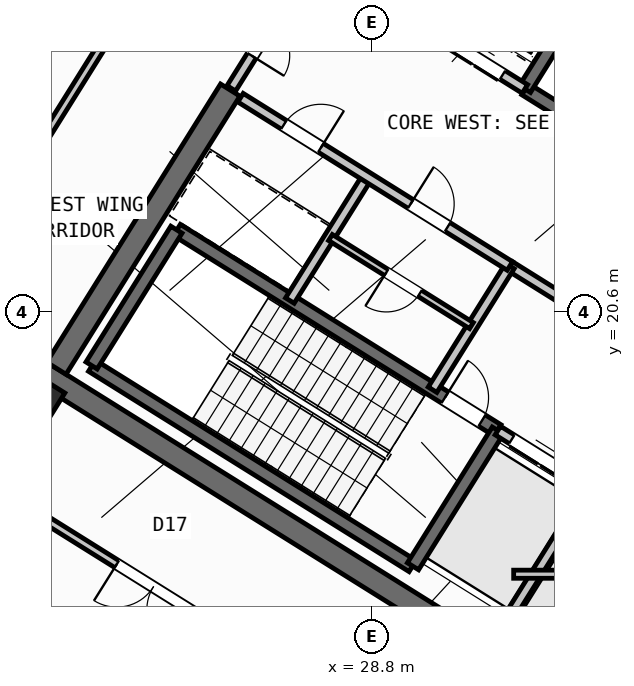
"""IFC4 building model, lengths in metres.
Left out: names, types, materials, properties, quantities, classifications, styles, units other than length and angle.
Written with IfcOpenShell. Run it as: python <this file> out.ifc"""

import sys

from ifc_helpers import new_model, si_unit, direction, frame, frame_2d, origin, origin_2d, place, context, subcontext, project, spatial, rectangle, hollow_rectangle, extrude, source, transform, mapped, element, fill, save


model = new_model("IFC4")
c1 = context("Model", 3, precision=1e-05, world=origin(), true_north=direction((0.0, 1.0)))
c2 = subcontext(c1, "Body", "Model", "MODEL_VIEW")
j1 = project(units=[si_unit("LENGTHUNIT", "METRE"), si_unit("PLANEANGLEUNIT", "RADIAN")], contexts=[c1])
p1 = place(None, origin())
s1 = spatial("IfcSite", under=j1, at=p1, CompositionType="ELEMENT")
p2 = place(p1, origin())
s2 = spatial("IfcBuilding", under=s1, at=p2, CompositionType="ELEMENT")
p3 = place(p2, frame((0.0, 0.0, 233.7)))
s3 = spatial("IfcBuildingStorey", under=s2, at=p3, CompositionType="ELEMENT", Elevation=233.7)
p4 = place(p3, frame((40.531, 24.036, 0.0), z_axis=(0.0, 0.0, 1.0), x_axis=(-0.848048787466, 0.529918157905, 0.0)))
e1 = element("IfcWall", 1, at=p4, inside=s3, PredefinedType="SHEAR", context=c2, shape_type="SweptSolid", body=[
    extrude(rectangle(XDim=13.04, YDim=0.45, at=frame_2d((6.52, 0.0))), origin(), (0.0, 0.0, 1.0), 4.55),
])
p5 = place(p3, frame((33.324, 12.503, 0.0), z_axis=(0.0, 0.0, 1.0), x_axis=(-0.848043529849, 0.529926571782, 0.0)))
e2 = element("IfcWall", 2, at=p5, inside=s3, PredefinedType="SHEAR", context=c2, shape_type="SweptSolid", body=[
    extrude(rectangle(XDim=13.04, YDim=0.45, at=frame_2d((6.52, 0.0))), origin(), (0.0, 0.0, 1.0), 4.55),
])
p6 = place(p3, frame((26.007, 24.976, 0.0), z_axis=(0.0, 0.0, 1.0), x_axis=(-0.529931155655, -0.848040665456, 0.0)))
e3 = element("IfcWall", 3, at=p6, inside=s3, PredefinedType="SHEAR", context=c2, shape_type="SweptSolid", body=[
    extrude(rectangle(XDim=6.475, YDim=0.45, at=frame_2d((3.238, 0.0))), origin(), (0.0, 0.0, 1.0), 4.55),
])
m1 = source(origin(), c2, "Body", "SweptSolid", [
    extrude(hollow_rectangle(XDim=0.8, YDim=0.8, WallThickness=0.032, at=origin_2d()), origin(), (0.0, 0.0, 1.0), 4.8),
])
p7 = place(p3, frame((22.191, 18.87, 0.0), z_axis=(0.0, 0.0, 1.0), x_axis=(-0.848048096156, 0.529919264233, 0.0)))
e4 = element("IfcColumn", 4, at=p7, inside=s3, PredefinedType="COLUMN", context=c2, shape_type="MappedRepresentation", body=[
    mapped(m1, transform((0.0, 0.0, 0.0), scale=1.0)),
])
p8 = place(p3, frame((29.268, 6.429, 0.0), z_axis=(0.0, 0.0, 1.0), x_axis=(-0.848049971435, 0.529916263149, 0.0)))
e5 = element("IfcWall", 5, at=p8, inside=s3, PredefinedType="STANDARD", context=c2, shape_type="SweptSolid", body=[
    extrude(rectangle(XDim=31.588, YDim=0.32, at=frame_2d((15.794, 0.0))), origin(), (0.0, 0.0, 1.0), 4.55),
])
p9 = place(p8, frame((15.901, 0.0, 0.0)))
e6 = element("IfcOpeningElement", 6, at=p9, cuts=e5, PredefinedType="OPENING", context=c2, shape_type="SweptSolid", body=[
    extrude(rectangle(XDim=1.2, YDim=2.15, at=frame_2d((0.6, 1.075))), frame((0.0, 0.17, 0.0), z_axis=(0.0, -1.0, 0.0), x_axis=(1.0, 0.0, 0.0)), (0.0, 0.0, 1.0), 0.34),
])
p10 = place(p8, frame((3.454, 0.0, 0.95)))
e7 = element("IfcOpeningElement", 7, at=p10, cuts=e5, PredefinedType="OPENING", context=c2, shape_type="SweptSolid", body=[
    extrude(rectangle(XDim=1.2, YDim=1.4, at=frame_2d((0.6, 0.7))), frame((0.0, 0.17, 0.0), z_axis=(0.0, -1.0, 0.0), x_axis=(1.0, 0.0, 0.0)), (0.0, 0.0, 1.0), 0.34),
])
p11 = place(p8, frame((7.561, 0.0, 0.85)))
e8 = element("IfcOpeningElement", 8, at=p11, cuts=e5, PredefinedType="OPENING", context=c2, shape_type="SweptSolid", body=[
    extrude(rectangle(XDim=1.8, YDim=1.5, at=frame_2d((0.9, 0.75))), frame((0.0, 0.17, 0.0), z_axis=(0.0, -1.0, 0.0), x_axis=(1.0, 0.0, 0.0)), (0.0, 0.0, 1.0), 0.34),
])
p12 = place(p8, frame((28.254, 0.0, 0.95)))
e9 = element("IfcOpeningElement", 9, at=p12, cuts=e5, PredefinedType="OPENING", context=c2, shape_type="SweptSolid", body=[
    extrude(rectangle(XDim=1.2, YDim=1.4, at=frame_2d((0.6, 0.7))), frame((0.0, 0.17, 0.0), z_axis=(0.0, -1.0, 0.0), x_axis=(1.0, 0.0, 0.0)), (0.0, 0.0, 1.0), 0.34),
])
p13 = place(p8, frame((19.234, 0.0, 1.0)))
e10 = element("IfcOpeningElement", 10, at=p13, cuts=e5, PredefinedType="OPENING", context=c2, shape_type="SweptSolid", body=[
    extrude(rectangle(XDim=0.9, YDim=1.25, at=frame_2d((0.45, 0.625))), frame((0.0, 0.17, 0.0), z_axis=(0.0, -1.0, 0.0), x_axis=(1.0, 0.0, 0.0)), (0.0, 0.0, 1.0), 0.34),
])
p14 = place(p8, frame((21.721, 0.0, 1.0)))
e11 = element("IfcOpeningElement", 11, at=p14, cuts=e5, PredefinedType="OPENING", context=c2, shape_type="SweptSolid", body=[
    extrude(rectangle(XDim=0.65, YDim=1.15, at=frame_2d((0.325, 0.575))), frame((0.0, 0.17, 0.0), z_axis=(0.0, -1.0, 0.0), x_axis=(1.0, 0.0, 0.0)), (0.0, 0.0, 1.0), 0.34),
])
p15 = place(p8, frame((23.631, 0.0, 1.0)))
e12 = element("IfcOpeningElement", 12, at=p15, cuts=e5, PredefinedType="OPENING", context=c2, shape_type="SweptSolid", body=[
    extrude(rectangle(XDim=0.9, YDim=1.25, at=frame_2d((0.45, 0.625))), frame((0.0, 0.17, 0.0), z_axis=(0.0, -1.0, 0.0), x_axis=(1.0, 0.0, 0.0)), (0.0, 0.0, 1.0), 0.34),
])
p16 = place(p8, frame((25.666, 0.0, 1.0)))
e13 = element("IfcOpeningElement", 13, at=p16, cuts=e5, PredefinedType="OPENING", context=c2, shape_type="SweptSolid", body=[
    extrude(rectangle(XDim=0.9, YDim=1.25, at=frame_2d((0.45, 0.625))), frame((0.0, 0.17, 0.0), z_axis=(0.0, -1.0, 0.0), x_axis=(1.0, 0.0, 0.0)), (0.0, 0.0, 1.0), 0.34),
])
p17 = place(p3, frame((14.138, 41.825, 0.0), z_axis=(0.0, 0.0, 1.0), x_axis=(0.848046498049, -0.529921821731, 0.0)))
e14 = element("IfcWall", 14, at=p17, inside=s3, PredefinedType="STANDARD", context=c2, shape_type="SweptSolid", body=[
    extrude(rectangle(XDim=31.588, YDim=0.32, at=frame_2d((15.794, 0.0))), origin(), (0.0, 0.0, 1.0), 4.55),
])
p18 = place(p17, frame((2.526, 0.0, 0.0)))
e15 = element("IfcOpeningElement", 15, at=p18, cuts=e14, PredefinedType="OPENING", context=c2, shape_type="SweptSolid", body=[
    extrude(rectangle(XDim=1.05, YDim=2.15, at=frame_2d((0.525, 1.075))), frame((0.0, 0.17, 0.0), z_axis=(0.0, -1.0, 0.0), x_axis=(1.0, 0.0, 0.0)), (0.0, 0.0, 1.0), 0.34),
])
p19 = place(p17, frame((14.274, 0.0, 0.0)))
e16 = element("IfcOpeningElement", 16, at=p19, cuts=e14, PredefinedType="OPENING", context=c2, shape_type="SweptSolid", body=[
    extrude(rectangle(XDim=1.5, YDim=2.25, at=frame_2d((0.75, 1.125))), frame((0.0, 0.17, 0.0), z_axis=(0.0, -1.0, 0.0), x_axis=(1.0, 0.0, 0.0)), (0.0, 0.0, 1.0), 0.34),
])
p20 = place(p17, frame((0.775, 0.0, 0.95)))
e17 = element("IfcOpeningElement", 17, at=p20, cuts=e14, PredefinedType="OPENING", context=c2, shape_type="SweptSolid", body=[
    extrude(rectangle(XDim=1.2, YDim=1.4, at=frame_2d((0.6, 0.7))), frame((0.0, 0.17, 0.0), z_axis=(0.0, -1.0, 0.0), x_axis=(1.0, 0.0, 0.0)), (0.0, 0.0, 1.0), 0.34),
])
p21 = place(p17, frame((9.552, 0.0, 0.85)))
e18 = element("IfcOpeningElement", 18, at=p21, cuts=e14, PredefinedType="OPENING", context=c2, shape_type="SweptSolid", body=[
    extrude(rectangle(XDim=1.8, YDim=1.5, at=frame_2d((0.9, 0.75))), frame((0.0, 0.17, 0.0), z_axis=(0.0, -1.0, 0.0), x_axis=(1.0, 0.0, 0.0)), (0.0, 0.0, 1.0), 0.34),
])
p22 = place(p17, frame((21.969, 0.0, 0.95)))
e19 = element("IfcOpeningElement", 19, at=p22, cuts=e14, PredefinedType="OPENING", context=c2, shape_type="SweptSolid", body=[
    extrude(rectangle(XDim=1.2, YDim=1.4, at=frame_2d((0.6, 0.7))), frame((0.0, 0.17, 0.0), z_axis=(0.0, -1.0, 0.0), x_axis=(1.0, 0.0, 0.0)), (0.0, 0.0, 1.0), 0.34),
])
p23 = place(p17, frame((27.619, 0.0, 0.95)))
e20 = element("IfcOpeningElement", 20, at=p23, cuts=e14, PredefinedType="OPENING", context=c2, shape_type="SweptSolid", body=[
    extrude(rectangle(XDim=1.2, YDim=1.4, at=frame_2d((0.6, 0.7))), frame((0.0, 0.17, 0.0), z_axis=(0.0, -1.0, 0.0), x_axis=(1.0, 0.0, 0.0)), (0.0, 0.0, 1.0), 0.34),
])
p24 = place(p3, frame((29.605, 15.581, 0.0), z_axis=(0.0, 0.0, 1.0), x_axis=(-0.848036911448, 0.529937163087, 0.0)))
e21 = element("IfcWall", 21, at=p24, inside=s3, PredefinedType="SHEAR", context=c2, shape_type="SweptSolid", body=[
    extrude(rectangle(XDim=7.46, YDim=0.26, at=frame_2d((3.73, 0.0))), origin(), (0.0, 0.0, 1.0), 4.55),
])
p25 = place(p3, frame((31.28, 18.261, 0.0), z_axis=(0.0, 0.0, 1.0), x_axis=(-0.848051618787, 0.529913626805, 0.0)))
e22 = element("IfcWall", 22, at=p25, inside=s3, PredefinedType="SHEAR", context=c2, shape_type="SweptSolid", body=[
    extrude(rectangle(XDim=7.46, YDim=0.26, at=frame_2d((3.73, 0.0))), origin(), (0.0, 0.0, 1.0), 4.55),
])
p26 = place(p25, frame((0.36, 0.0, 0.0)))
e23 = element("IfcOpeningElement", 23, at=p26, cuts=e22, PredefinedType="OPENING", context=c2, shape_type="SweptSolid", body=[
    extrude(rectangle(XDim=0.86, YDim=2.05, at=frame_2d((0.43, 1.025))), frame((0.0, 0.14, 0.0), z_axis=(0.0, -1.0, 0.0), x_axis=(1.0, 0.0, 0.0)), (0.0, 0.0, 1.0), 0.28),
])
p27 = place(p3, frame((31.288, 18.256, 0.0), z_axis=(0.0, 0.0, 1.0), x_axis=(-0.529943379326, -0.848033026897, 0.0)))
e24 = element("IfcWall", 24, at=p27, inside=s3, PredefinedType="SHEAR", context=c2, shape_type="SweptSolid", body=[
    extrude(rectangle(XDim=3.16, YDim=0.26, at=frame_2d((1.58, 0.0))), origin(), (0.0, 0.0, 1.0), 4.55),
])
p28 = place(p3, frame((24.945, 22.22, 0.0), z_axis=(0.0, 0.0, 1.0), x_axis=(-0.529908658664, -0.84805472316, 0.0)))
e25 = element("IfcWall", 25, at=p28, inside=s3, PredefinedType="SHEAR", context=c2, shape_type="SweptSolid", body=[
    extrude(rectangle(XDim=3.16, YDim=0.26, at=frame_2d((1.58, 0.0))), origin(), (0.0, 0.0, 1.0), 4.55),
])
p29 = place(p3, frame((38.046, 21.108, 0.0), z_axis=(0.0, 0.0, 1.0), x_axis=(-0.848054434086, 0.529909121291, 0.0)))
e26 = element("IfcWall", 26, at=p29, inside=s3, PredefinedType="SHEAR", context=c2, shape_type="SweptSolid", body=[
    extrude(rectangle(XDim=7.33, YDim=0.26, at=frame_2d((3.665, 0.0))), origin(), (0.0, 0.0, 1.0), 4.55),
])
p30 = place(p29, frame((0.22, 0.0, 0.0)))
e27 = element("IfcOpeningElement", 27, at=p30, cuts=e26, PredefinedType="OPENING", context=c2, shape_type="SweptSolid", body=[
    extrude(rectangle(XDim=1.1, YDim=2.1, at=frame_2d((0.55, 1.05))), frame((0.0, 0.14, 0.0), z_axis=(0.0, -1.0, 0.0), x_axis=(1.0, 0.0, 0.0)), (0.0, 0.0, 1.0), 0.28),
])
p31 = place(p3, frame((33.496, 27.677, 0.0), z_axis=(0.0, 0.0, 1.0), x_axis=(-0.529908658664, -0.84805472316, 0.0)))
e28 = element("IfcWall", 28, at=p31, inside=s3, PredefinedType="SHEAR", context=c2, shape_type="SweptSolid", body=[
    extrude(rectangle(XDim=3.16, YDim=0.26, at=frame_2d((1.58, 0.0))), origin(), (0.0, 0.0, 1.0), 4.55),
])
p32 = place(p3, frame((34.933, 15.978, 0.0), z_axis=(0.0, 0.0, 1.0), x_axis=(-0.848055739377, 0.529907032327, 0.0)))
e29 = element("IfcWall", 29, at=p32, inside=s3, PredefinedType="STANDARD", context=c2, shape_type="SweptSolid", body=[
    extrude(rectangle(XDim=4.298, YDim=0.2, at=frame_2d((2.149, 0.0))), origin(), (0.0, 0.0, 1.0), 4.54),
])
p33 = place(p32, frame((0.448, 0.0, 0.0)))
e30 = element("IfcOpeningElement", 30, at=p33, cuts=e29, PredefinedType="OPENING", context=c2, shape_type="SweptSolid", body=[
    extrude(rectangle(XDim=1.3, YDim=2.2, at=frame_2d((0.65, 1.1))), frame((0.0, 0.11, 0.0), z_axis=(0.0, -1.0, 0.0), x_axis=(1.0, 0.0, 0.0)), (0.0, 0.0, 1.0), 0.22),
])
p34 = place(p32, frame((2.523, 0.0, 0.0)))
e31 = element("IfcOpeningElement", 31, at=p34, cuts=e29, PredefinedType="OPENING", context=c2, shape_type="SweptSolid", body=[
    extrude(rectangle(XDim=1.45, YDim=2.25, at=frame_2d((0.725, 1.125))), frame((0.0, 0.11, 0.0), z_axis=(0.0, -1.0, 0.0), x_axis=(1.0, 0.0, 0.0)), (0.0, 0.0, 1.0), 0.22),
])
p35 = place(p3, frame((36.459, 18.421, 0.0), z_axis=(0.0, 0.0, 1.0), x_axis=(-0.848059591691, 0.529900867089, 0.0)))
e32 = element("IfcWall", 32, at=p35, inside=s3, PredefinedType="STANDARD", context=c2, shape_type="SweptSolid", body=[
    extrude(rectangle(XDim=5.818, YDim=0.2, at=frame_2d((2.909, 0.0))), origin(), (0.0, 0.0, 1.0), 4.54),
])
p36 = place(p35, frame((2.598, 0.0, 0.0)))
e33 = element("IfcOpeningElement", 33, at=p36, cuts=e32, PredefinedType="OPENING", context=c2, shape_type="SweptSolid", body=[
    extrude(rectangle(XDim=1.15, YDim=2.1, at=frame_2d((0.575, 1.05))), frame((0.0, 0.11, 0.0), z_axis=(0.0, -1.0, 0.0), x_axis=(1.0, 0.0, 0.0)), (0.0, 0.0, 1.0), 0.22),
])
p37 = place(p3, frame((31.822, 24.998, 0.0), z_axis=(0.0, 0.0, 1.0), x_axis=(-0.848054125777, 0.529909614701, 0.0)))
e34 = element("IfcWall", 34, at=p37, inside=s3, PredefinedType="STANDARD", context=c2, shape_type="SweptSolid", body=[
    extrude(rectangle(XDim=4.668, YDim=0.2, at=frame_2d((2.334, 0.0))), origin(), (0.0, 0.0, 1.0), 4.54),
])
p38 = place(p37, frame((0.52, 0.0, 0.0)))
e35 = element("IfcOpeningElement", 35, at=p38, cuts=e34, PredefinedType="OPENING", context=c2, shape_type="SweptSolid", body=[
    extrude(rectangle(XDim=1.2, YDim=2.15, at=frame_2d((0.6, 1.075))), frame((0.0, 0.11, 0.0), z_axis=(0.0, -1.0, 0.0), x_axis=(1.0, 0.0, 0.0)), (0.0, 0.0, 1.0), 0.22),
])
p39 = place(p37, frame((2.54, 0.0, 0.0)))
e36 = element("IfcOpeningElement", 36, at=p39, cuts=e34, PredefinedType="OPENING", context=c2, shape_type="SweptSolid", body=[
    extrude(rectangle(XDim=1.2, YDim=2.15, at=frame_2d((0.6, 1.075))), frame((0.0, 0.11, 0.0), z_axis=(0.0, -1.0, 0.0), x_axis=(1.0, 0.0, 0.0)), (0.0, 0.0, 1.0), 0.22),
])
p40 = place(p3, frame((33.029, 17.003, 0.0), z_axis=(0.0, 0.0, 1.0), x_axis=(-0.529916267533, -0.848049968695, 0.0)))
e37 = element("IfcWall", 37, at=p40, inside=s3, PredefinedType="STANDARD", context=c2, shape_type="SweptSolid", body=[
    extrude(rectangle(XDim=2.92, YDim=0.2, at=frame_2d((1.46, 0.0))), origin(), (0.0, 0.0, 1.0), 4.54),
])
for number, where, z_axis, x_axis in (
    (38, (31.525, 21.504, 0.0), (0.0, 0.0, 1.0), (-0.53, -0.848, 0.0)),
    (39, (28.71, 23.263, 0.0), (0.0, 0.0, 1.0), (-0.53, -0.848, 0.0)),
):
    element("IfcWall", number, at=place(p3, frame(where, z_axis=z_axis, x_axis=x_axis)), inside=s3, PredefinedType="STANDARD", context=c2, shape_type="SweptSolid", body=[
        extrude(rectangle(XDim=2.88, YDim=0.2, at=frame_2d((1.44, 0.0))), origin(), (0.0, 0.0, 1.0), 4.54),
    ])
p41 = place(p3, frame((31.525, 21.504, 0.0), z_axis=(0.0, 0.0, 1.0), x_axis=(-0.848042066329, 0.529928913853, 0.0)))
e40 = element("IfcWall", 40, at=p41, inside=s3, PredefinedType="STANDARD", context=c2, shape_type="SweptSolid", body=[
    extrude(rectangle(XDim=6.268, YDim=0.2, at=frame_2d((3.134, 0.0))), origin(), (0.0, 0.0, 1.0), 4.54),
])
p42 = place(p41, frame((4.4, 0.0, 0.0)))
e41 = element("IfcOpeningElement", 41, at=p42, cuts=e40, PredefinedType="OPENING", context=c2, shape_type="SweptSolid", body=[
    extrude(rectangle(XDim=0.86, YDim=2.05, at=frame_2d((0.43, 1.025))), frame((0.0, 0.11, 0.0), z_axis=(0.0, -1.0, 0.0), x_axis=(1.0, 0.0, 0.0)), (0.0, 0.0, 1.0), 0.22),
])
p43 = place(p41, frame((1.45, 0.0, 0.0)))
e42 = element("IfcOpeningElement", 42, at=p43, cuts=e40, PredefinedType="OPENING", context=c2, shape_type="SweptSolid", body=[
    extrude(rectangle(XDim=0.86, YDim=2.05, at=frame_2d((0.43, 1.025))), frame((0.0, 0.11, 0.0), z_axis=(0.0, -1.0, 0.0), x_axis=(1.0, 0.0, 0.0)), (0.0, 0.0, 1.0), 0.22),
])
p44 = place(p3, frame((30.766, 20.327, 0.0), z_axis=(0.0, 0.0, 1.0), x_axis=(-0.848052663127, 0.529911955482, 0.0)))
e43 = element("IfcWall", 43, at=p44, inside=s3, PredefinedType="PLUMBINGWALL", context=c2, shape_type="SweptSolid", body=[
    extrude(rectangle(XDim=3.28, YDim=0.14, at=frame_2d((1.64, 0.0))), origin(), (0.0, 0.0, 1.0), 4.54),
])
p45 = place(p44, frame((1.2, 0.0, 0.0)))
e44 = element("IfcOpeningElement", 44, at=p45, cuts=e43, PredefinedType="OPENING", context=c2, shape_type="SweptSolid", body=[
    extrude(rectangle(XDim=0.78, YDim=2.05, at=frame_2d((0.39, 1.025))), frame((0.0, 0.08, 0.0), z_axis=(0.0, -1.0, 0.0), x_axis=(1.0, 0.0, 0.0)), (0.0, 0.0, 1.0), 0.16),
])
p46 = place(p3, frame((27.596, 27.52, 0.0), z_axis=(0.0, 0.0, 1.0), x_axis=(-0.529865479138, -0.848081702443, 0.0)))
e45 = element("IfcWall", 45, at=p46, inside=s3, PredefinedType="STANDARD", context=c2, shape_type="SweptSolid", body=[
    extrude(rectangle(XDim=2.96, YDim=0.2, at=frame_2d((1.48, 0.0))), origin(), (0.0, 0.0, 1.0), 4.54),
])
p47 = place(p46, frame((0.7, 0.0, 0.0)))
e46 = element("IfcOpeningElement", 46, at=p47, cuts=e45, PredefinedType="OPENING", context=c2, shape_type="SweptSolid", body=[
    extrude(rectangle(XDim=1.5, YDim=2.15, at=frame_2d((0.75, 1.075))), frame((0.0, 0.11, 0.0), z_axis=(0.0, -1.0, 0.0), x_axis=(1.0, 0.0, 0.0)), (0.0, 0.0, 1.0), 0.22),
])
p48 = place(p3, frame((23.899, 26.529, 0.0), z_axis=(0.0, 0.0, 1.0), x_axis=(-0.529917716469, -0.848049063305, 0.0)))
e47 = element("IfcWall", 47, at=p48, inside=s3, PredefinedType="PARTITIONING", context=c2, shape_type="SweptSolid", body=[
    extrude(rectangle(XDim=14.05, YDim=0.16, at=frame_2d((7.025, 0.0))), origin(), (0.0, 0.0, 1.0), 4.54),
])
p49 = place(p3, frame((22.585, 27.35, 0.0), z_axis=(0.0, 0.0, 1.0), x_axis=(-0.529977067289, -0.848011974059, 0.0)))
e48 = element("IfcWall", 48, at=p49, inside=s3, PredefinedType="PLUMBINGWALL", context=c2, shape_type="SweptSolid", body=[
    extrude(rectangle(XDim=3.01, YDim=0.14, at=frame_2d((1.505, 0.0))), origin(), (0.0, 0.0, 1.0), 4.225),
])
p50 = place(p49, frame((1.115, 0.0, 0.0)))
e49 = element("IfcOpeningElement", 49, at=p50, cuts=e48, PredefinedType="OPENING", context=c2, shape_type="SweptSolid", body=[
    extrude(rectangle(XDim=0.78, YDim=2.05, at=frame_2d((0.39, 1.025))), frame((0.0, 0.08, 0.0), z_axis=(0.0, -1.0, 0.0), x_axis=(1.0, 0.0, 0.0)), (0.0, 0.0, 1.0), 0.16),
])
p51 = place(p3, frame((32.164, 10.374, 0.0), z_axis=(0.0, 0.0, 1.0), x_axis=(-0.848044107957, 0.529925646633, 0.0)))
e50 = element("IfcWall", 50, at=p51, inside=s3, PredefinedType="PARTITIONING", context=c2, shape_type="SweptSolid", body=[
    extrude(rectangle(XDim=15.57, YDim=0.16, at=frame_2d((7.785, 0.0))), origin(), (0.0, 0.0, 1.0), 4.54),
])
p52 = place(p51, frame((4.1, 0.0, 0.0)))
e51 = element("IfcOpeningElement", 51, at=p52, cuts=e50, PredefinedType="OPENING", context=c2, shape_type="SweptSolid", body=[
    extrude(rectangle(XDim=0.96, YDim=2.08, at=frame_2d((0.48, 1.04))), frame((0.0, 0.09, 0.0), z_axis=(0.0, -1.0, 0.0), x_axis=(1.0, 0.0, 0.0)), (0.0, 0.0, 1.0), 0.18),
])
p53 = place(p51, frame((8.2, 0.0, 0.0)))
e52 = element("IfcOpeningElement", 52, at=p53, cuts=e50, PredefinedType="OPENING", context=c2, shape_type="SweptSolid", body=[
    extrude(rectangle(XDim=1.7, YDim=2.2, at=frame_2d((0.85, 1.1))), frame((0.0, 0.09, 0.0), z_axis=(0.0, -1.0, 0.0), x_axis=(1.0, 0.0, 0.0)), (0.0, 0.0, 1.0), 0.18),
])
p54 = place(p3, frame((31.6, 15.42, 0.0), z_axis=(0.0, 0.0, 1.0), x_axis=(1.0, 0.0, 0.0)))
e53 = element("IfcWall", 53, at=p54, inside=s3, PredefinedType="PARTITIONING", context=c2, shape_type="SweptSolid", body=[
    extrude(rectangle(XDim=2.984, YDim=0.16, at=frame_2d((1.492, 0.0))), origin(), (0.0, 0.0, 1.0), 4.54),
])
m2 = source(origin(), c2, "Body", "SweptSolid", [
    extrude(rectangle(XDim=0.86, YDim=2.05, at=frame_2d((0.43, 1.025))), frame((0.0, 0.025, 0.0), z_axis=(0.0, -1.0, 0.0), x_axis=(1.0, 0.0, 0.0)), (0.0, 0.0, 1.0), 0.05),
])
p55 = place(p26, frame((0.86, 0.0, 0.0), z_axis=(0.0, 0.0, 1.0), x_axis=(-1.0, 0.0, 0.0)))
e54 = element("IfcDoor", 54, at=p55, inside=s3, OperationType="SINGLE_SWING_LEFT", PredefinedType="DOOR", context=c2, shape_type="MappedRepresentation", body=[
    mapped(m2, transform((0.0, 0.0, 0.0), scale=1.0)),
])
fill(e23, e54)
m3 = source(origin(), c2, "Body", "SweptSolid", [
    extrude(rectangle(XDim=1.45, YDim=2.25, at=frame_2d((0.725, 1.125))), frame((0.0, 0.025, 0.0), z_axis=(0.0, -1.0, 0.0), x_axis=(1.0, 0.0, 0.0)), (0.0, 0.0, 1.0), 0.05),
])
p56 = place(p34, origin())
e55 = element("IfcDoor", 55, at=p56, inside=s3, OperationType="DOUBLE_DOOR_SLIDING", PredefinedType="DOOR", context=c2, shape_type="MappedRepresentation", body=[
    mapped(m3, transform((0.0, 0.0, 0.0), scale=1.0)),
])
fill(e31, e55)
m4 = source(origin(), c2, "Body", "SweptSolid", [
    extrude(rectangle(XDim=1.2, YDim=2.15, at=frame_2d((0.6, 1.075))), frame((0.0, 0.025, 0.0), z_axis=(0.0, -1.0, 0.0), x_axis=(1.0, 0.0, 0.0)), (0.0, 0.0, 1.0), 0.05),
])
p57 = place(p38, origin())
e56 = element("IfcDoor", 56, at=p57, inside=s3, OperationType="DOUBLE_DOOR_SLIDING", PredefinedType="DOOR", context=c2, shape_type="MappedRepresentation", body=[
    mapped(m4, transform((0.0, 0.0, 0.0), scale=1.0)),
])
fill(e35, e56)
p58 = place(p42, frame((0.86, 0.0, 0.0), z_axis=(0.0, 0.0, 1.0), x_axis=(-1.0, 0.0, 0.0)))
e57 = element("IfcDoor", 57, at=p58, inside=s3, OperationType="SINGLE_SWING_RIGHT", PredefinedType="DOOR", context=c2, shape_type="MappedRepresentation", body=[
    mapped(m2, transform((0.0, 0.0, 0.0), scale=1.0)),
])
fill(e41, e57)
p59 = place(p43, frame((0.86, 0.0, 0.0), z_axis=(0.0, 0.0, 1.0), x_axis=(-1.0, 0.0, 0.0)))
e58 = element("IfcDoor", 58, at=p59, inside=s3, OperationType="SINGLE_SWING_LEFT", PredefinedType="DOOR", context=c2, shape_type="MappedRepresentation", body=[
    mapped(m2, transform((0.0, 0.0, 0.0), scale=1.0)),
])
fill(e42, e58)
m5 = source(origin(), c2, "Body", "SweptSolid", [
    extrude(rectangle(XDim=0.78, YDim=2.05, at=frame_2d((0.39, 1.025))), frame((0.0, 0.025, 0.0), z_axis=(0.0, -1.0, 0.0), x_axis=(1.0, 0.0, 0.0)), (0.0, 0.0, 1.0), 0.05),
])
p60 = place(p45, origin())
e59 = element("IfcDoor", 59, at=p60, inside=s3, OperationType="SINGLE_SWING_RIGHT", PredefinedType="DOOR", context=c2, shape_type="MappedRepresentation", body=[
    mapped(m5, transform((0.0, 0.0, 0.0), scale=1.0)),
])
fill(e44, e59)
m6 = source(origin(), c2, "Body", "SweptSolid", [
    extrude(rectangle(XDim=1.5, YDim=2.15, at=frame_2d((0.75, 1.075))), frame((0.0, 0.025, 0.0), z_axis=(0.0, -1.0, 0.0), x_axis=(1.0, 0.0, 0.0)), (0.0, 0.0, 1.0), 0.05),
])
p61 = place(p47, origin())
e60 = element("IfcDoor", 60, at=p61, inside=s3, OperationType="DOUBLE_DOOR_SINGLE_SWING", PredefinedType="DOOR", context=c2, shape_type="MappedRepresentation", body=[
    mapped(m6, transform((0.0, 0.0, 0.0), scale=1.0)),
])
fill(e46, e60)
m7 = source(origin(), c2, "Body", "SweptSolid", [
    extrude(rectangle(XDim=1.7, YDim=2.2, at=frame_2d((0.85, 1.1))), frame((0.0, 0.025, 0.0), z_axis=(0.0, -1.0, 0.0), x_axis=(1.0, 0.0, 0.0)), (0.0, 0.0, 1.0), 0.05),
])
p62 = place(p53, origin())
e61 = element("IfcDoor", 61, at=p62, inside=s3, OperationType="DOUBLE_DOOR_SINGLE_SWING", PredefinedType="DOOR", context=c2, shape_type="MappedRepresentation", body=[
    mapped(m7, transform((0.0, 0.0, 0.0), scale=1.0)),
])
fill(e52, e61)
save(model, sys.argv[1])
